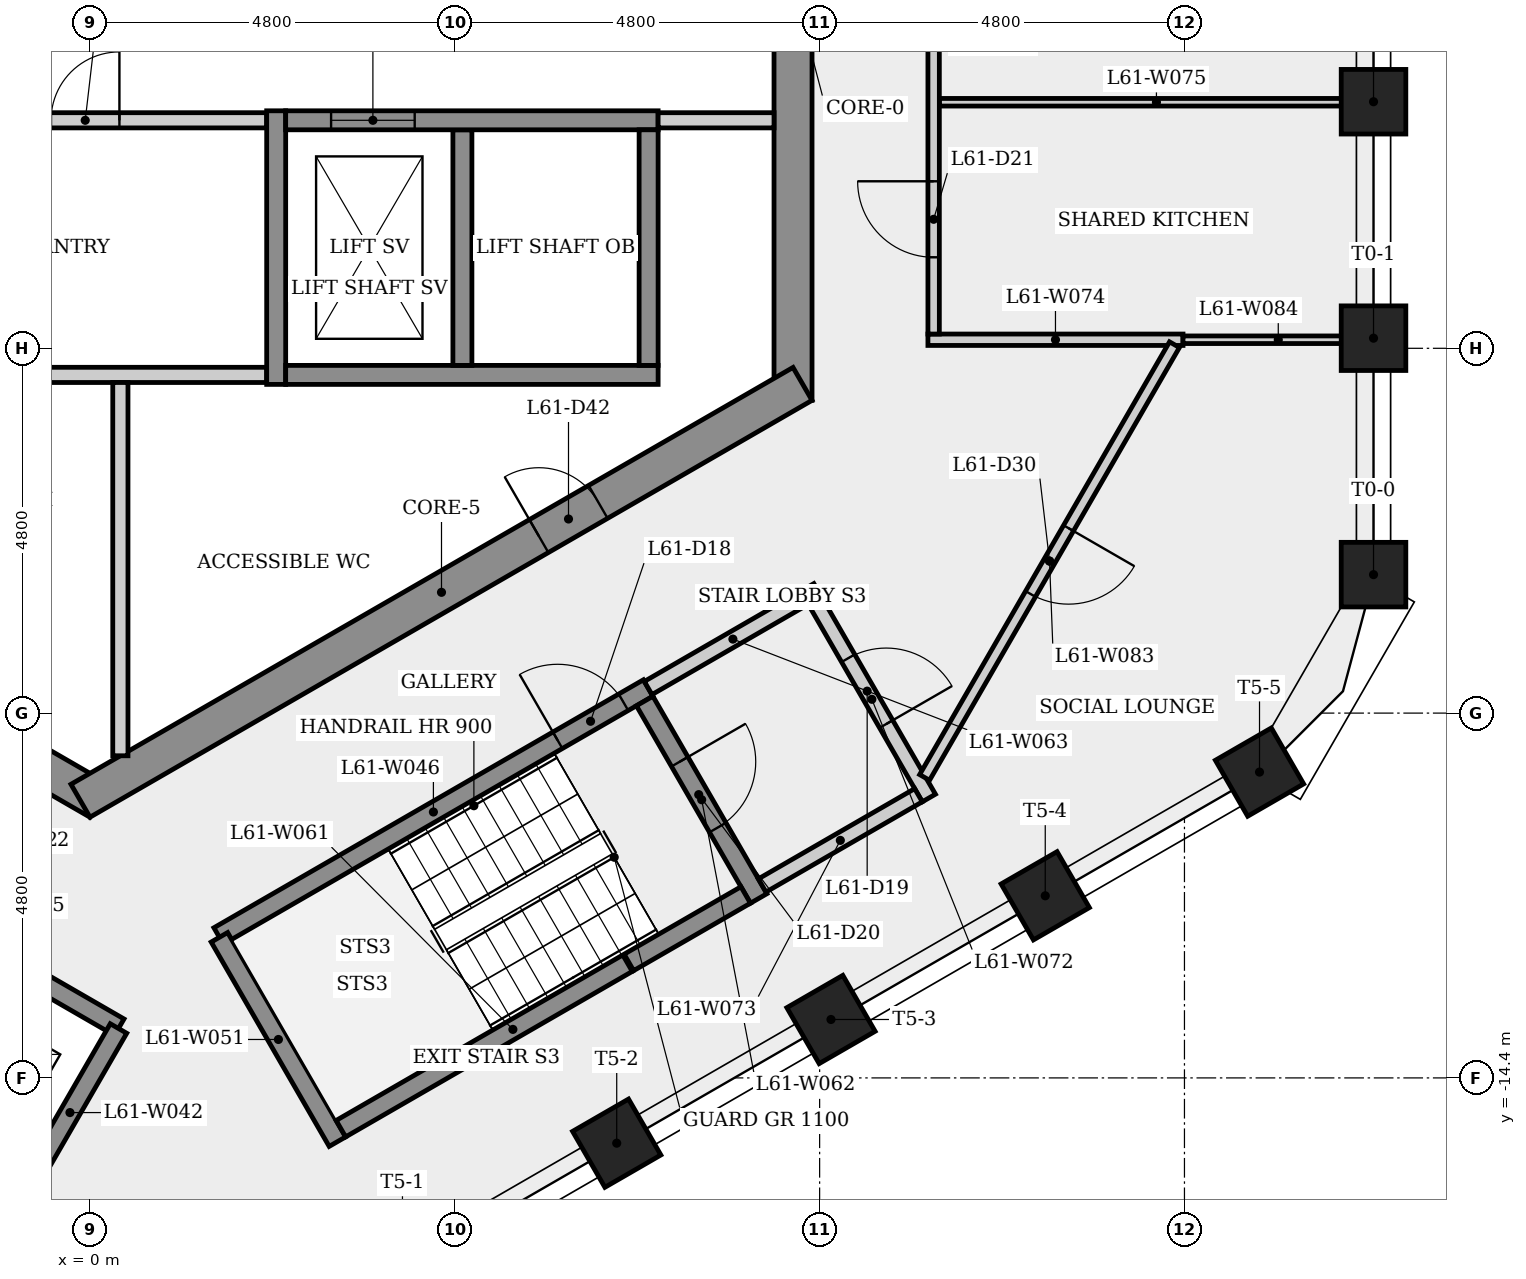
"""IFC4 building model, lengths in metres.
Left out: names, types, materials, properties, quantities, classifications, styles, units other than length and angle.
Written with IfcOpenShell. Run it as: python <this file> out.ifc"""

import sys

from ifc_helpers import new_model, si_unit, direction, frame, frame_2d, origin, origin_2d, place, context, subcontext, project, spatial, rectangle, extrude, element, fill, save


model = new_model("IFC4")
c1 = context("Model", 3, precision=1e-05, world=origin(), true_north=direction((0.0, 1.0)))
c2 = subcontext(c1, "Body", "Model", "MODEL_VIEW")
j1 = project(units=[si_unit("LENGTHUNIT", "METRE"), si_unit("PLANEANGLEUNIT", "RADIAN")], contexts=[c1])
p1 = place(None, origin())
s1 = spatial("IfcSite", under=j1, at=p1, CompositionType="ELEMENT")
p2 = place(p1, origin())
s2 = spatial("IfcBuilding", under=s1, at=p2, CompositionType="ELEMENT")
p3 = place(p2, frame((0.0, 0.0, 229.1)))
s3 = spatial("IfcBuildingStorey", under=s2, at=p3, CompositionType="ELEMENT", Elevation=229.1)
p4 = place(p3, frame((9.25, -5.485, 0.0), z_axis=(0.0, 0.0, 1.0), x_axis=(0.0, 1.0, 0.0)))
e1 = element("IfcWall", 1, at=p4, inside=s3, PredefinedType="SHEAR", context=c2, shape_type="SweptSolid", body=[
    extrude(rectangle(XDim=10.97, YDim=0.5, at=frame_2d((5.485, 0.0))), origin(), (0.0, 0.0, 1.0), 3.4),
])
p5 = place(p4, frame((4.685, 0.0, 0.0)))
e2 = element("IfcOpeningElement", 2, at=p5, cuts=e1, PredefinedType="OPENING", context=c2, shape_type="SweptSolid", body=[
    extrude(rectangle(XDim=1.6, YDim=2.1, at=frame_2d((0.8, 1.05))), frame((0.0, 0.26, 0.0), z_axis=(0.0, -1.0, 0.0), x_axis=(1.0, 0.0, 0.0)), (0.0, 0.0, 1.0), 0.52),
])
p6 = place(p3, frame((-9.375, -5.268, 0.0), z_axis=(0.0, 0.0, 1.0), x_axis=(0.866023993627, -0.500002442456, 0.0)))
e3 = element("IfcWall", 3, at=p6, inside=s3, PredefinedType="SHEAR", context=c2, shape_type="SweptSolid", body=[
    extrude(rectangle(XDim=10.97, YDim=0.5, at=frame_2d((5.485, 0.0))), origin(), (0.0, 0.0, 1.0), 3.4),
])
p7 = place(p6, frame((3.073, 0.0, 0.0)))
e4 = element("IfcOpeningElement", 4, at=p7, cuts=e3, PredefinedType="OPENING", context=c2, shape_type="SweptSolid", body=[
    extrude(rectangle(XDim=0.9, YDim=2.1, at=frame_2d((0.45, 1.05))), frame((0.0, 0.26, 0.0), z_axis=(0.0, -1.0, 0.0), x_axis=(1.0, 0.0, 0.0)), (0.0, 0.0, 1.0), 0.52),
])
p8 = place(p6, frame((8.267, 0.0, 0.0)))
e5 = element("IfcOpeningElement", 5, at=p8, cuts=e3, PredefinedType="OPENING", context=c2, shape_type="SweptSolid", body=[
    extrude(rectangle(XDim=0.9, YDim=2.1, at=frame_2d((0.45, 1.05))), frame((0.0, 0.26, 0.0), z_axis=(0.0, -1.0, 0.0), x_axis=(1.0, 0.0, 0.0)), (0.0, 0.0, 1.0), 0.52),
])
p9 = place(p3, frame((-0.125, -10.753, 0.0), z_axis=(0.0, 0.0, 1.0), x_axis=(0.866023993627, 0.500002442456, 0.0)))
e6 = element("IfcWall", 6, at=p9, inside=s3, PredefinedType="SHEAR", context=c2, shape_type="SweptSolid", body=[
    extrude(rectangle(XDim=10.97, YDim=0.5, at=frame_2d((5.485, 0.0))), origin(), (0.0, 0.0, 1.0), 3.4),
])
p10 = place(p9, frame((6.964, 0.0, 0.0)))
e7 = element("IfcOpeningElement", 7, at=p10, cuts=e6, PredefinedType="OPENING", context=c2, shape_type="SweptSolid", body=[
    extrude(rectangle(XDim=0.9, YDim=2.1, at=frame_2d((0.45, 1.05))), frame((0.0, 0.26, 0.0), z_axis=(0.0, -1.0, 0.0), x_axis=(1.0, 0.0, 0.0)), (0.0, 0.0, 1.0), 0.52),
])
for number, where, z_axis, x_axis in (
    (8, (16.887, -7.778, 0.0), (0.0, 0.0, 1.0), (1.0, 0.0, 0.0)),
    (9, (16.887, -4.667, 0.0), (0.0, 0.0, 1.0), (1.0, 0.0, 0.0)),
    (10, (16.887, -1.556, 0.0), (0.0, 0.0, 1.0), (1.0, 0.0, 0.0)),
    (11, (6.93, -15.259, 0.0), (0.0, 0.0, 1.0), (0.5, -0.866, 0.0)),
    (12, (9.75, -13.631, 0.0), (0.0, 0.0, 1.0), (0.5, -0.866, 0.0)),
    (13, (12.568, -12.004, 0.0), (0.0, 0.0, 1.0), (0.5, -0.866, 0.0)),
    (14, (15.387, -10.376, 0.0), (0.0, 0.0, 1.0), (0.5, -0.866, 0.0)),
):
    element("IfcColumn", number, at=place(p3, frame(where, z_axis=z_axis, x_axis=x_axis)), inside=s3, PredefinedType="COLUMN", context=c2, shape_type="SweptSolid", body=[
        extrude(rectangle(XDim=0.85, YDim=0.85, at=origin_2d()), origin(), (0.0, 0.0, 1.0), 3.4),
    ])
p11 = place(p3, frame((-9.0, -5.15, 0.0), z_axis=(0.0, 0.0, 1.0), x_axis=(1.0, 0.0, 0.0)))
e15 = element("IfcWall", 15, at=p11, inside=s3, PredefinedType="PARTITIONING", context=c2, shape_type="SweptSolid", body=[
    extrude(rectangle(XDim=11.325, YDim=0.2, at=frame_2d((5.663, 0.0))), origin(), (0.0, 0.0, 1.0), 3.05),
])
p12 = place(p3, frame((-9.0, -1.8, 0.0), z_axis=(0.0, 0.0, 1.0), x_axis=(1.0, 0.0, 0.0)))
e16 = element("IfcWall", 16, at=p12, inside=s3, PredefinedType="PARTITIONING", context=c2, shape_type="SweptSolid", body=[
    extrude(rectangle(XDim=11.325, YDim=0.2, at=frame_2d((5.663, 0.0))), origin(), (0.0, 0.0, 1.0), 3.05),
])
p13 = place(p12, frame((2.535, 0.0, 0.0)))
e17 = element("IfcOpeningElement", 17, at=p13, cuts=e16, PredefinedType="OPENING", context=c2, shape_type="SweptSolid", body=[
    extrude(rectangle(XDim=0.9, YDim=2.1, at=frame_2d((0.45, 1.05))), frame((0.0, 0.11, 0.0), z_axis=(0.0, -1.0, 0.0), x_axis=(1.0, 0.0, 0.0)), (0.0, 0.0, 1.0), 0.22),
])
p14 = place(p12, frame((8.488, 0.0, 0.0)))
e18 = element("IfcOpeningElement", 18, at=p14, cuts=e16, PredefinedType="OPENING", context=c2, shape_type="SweptSolid", body=[
    extrude(rectangle(XDim=0.9, YDim=2.1, at=frame_2d((0.45, 1.05))), frame((0.0, 0.11, 0.0), z_axis=(0.0, -1.0, 0.0), x_axis=(1.0, 0.0, 0.0)), (0.0, 0.0, 1.0), 0.22),
])
p15 = place(p3, frame((-2.364, -12.145, 0.0), z_axis=(0.0, 0.0, 1.0), x_axis=(0.866048579423, -0.499959856469, 0.0)))
e19 = element("IfcWall", 19, at=p15, inside=s3, PredefinedType="SHEAR", context=c2, shape_type="SweptSolid", body=[
    extrude(rectangle(XDim=3.175, YDim=0.25, at=frame_2d((1.587, 0.0))), origin(), (0.0, 0.0, 1.0), 3.4),
])
p16 = place(p3, frame((0.375, -13.75, 0.0), z_axis=(0.0, 0.0, 1.0), x_axis=(-0.50003400563, -0.866005769735, 0.0)))
e20 = element("IfcWall", 20, at=p16, inside=s3, PredefinedType="SHEAR", context=c2, shape_type="SweptSolid", body=[
    extrude(rectangle(XDim=2.555, YDim=0.25, at=frame_2d((1.277, 0.0))), origin(), (0.0, 0.0, 1.0), 3.4),
])
p17 = place(p3, frame((0.4, -5.25, 0.0), z_axis=(0.0, 0.0, 1.0), x_axis=(0.0, -1.0, 0.0)))
e21 = element("IfcWall", 21, at=p17, inside=s3, PredefinedType="PARTITIONING", context=c2, shape_type="SweptSolid", body=[
    extrude(rectangle(XDim=4.911, YDim=0.2, at=frame_2d((2.456, 0.0))), origin(), (0.0, 0.0, 1.0), 3.05),
])
p18 = place(p3, frame((1.693, -12.532, 0.0), z_axis=(0.0, 0.0, 1.0), x_axis=(0.866031063448, 0.499990197047, 0.0)))
e22 = element("IfcWall", 22, at=p18, inside=s3, PredefinedType="SHEAR", context=c2, shape_type="SweptSolid", body=[
    extrude(rectangle(XDim=6.525, YDim=0.25, at=frame_2d((3.263, 0.0))), origin(), (0.0, 0.0, 1.0), 3.05),
])
p19 = place(p18, frame((5.15, 0.0, 0.0)))
e23 = element("IfcOpeningElement", 23, at=p19, cuts=e22, PredefinedType="OPENING", context=c2, shape_type="SweptSolid", body=[
    extrude(rectangle(XDim=1.0, YDim=2.1, at=frame_2d((0.5, 1.05))), frame((0.0, 0.135, 0.0), z_axis=(0.0, -1.0, 0.0), x_axis=(1.0, 0.0, 0.0)), (0.0, 0.0, 1.0), 0.27),
])
p20 = place(p3, frame((2.45, -5.275, 0.0), z_axis=(0.0, 0.0, 1.0), x_axis=(0.0, 1.0, 0.0)))
e24 = element("IfcWall", 24, at=p20, inside=s3, PredefinedType="SHEAR", context=c2, shape_type="SweptSolid", body=[
    extrude(rectangle(XDim=3.6, YDim=0.25, at=frame_2d((1.8, 0.0))), origin(), (0.0, 0.0, 1.0), 3.05),
])
p21 = place(p3, frame((3.256, -15.239, 0.0), z_axis=(0.0, 0.0, 1.0), x_axis=(-0.500003782172, 0.866023220135, 0.0)))
e25 = element("IfcWall", 25, at=p21, inside=s3, PredefinedType="SHEAR", context=c2, shape_type="SweptSolid", body=[
    extrude(rectangle(XDim=3.105, YDim=0.25, at=frame_2d((1.552, 0.0))), origin(), (0.0, 0.0, 1.0), 3.05),
])
p22 = place(p3, frame((2.575, -5.15, 0.0), z_axis=(0.0, 0.0, 1.0), x_axis=(1.0, 0.0, 0.0)))
e26 = element("IfcWall", 26, at=p22, inside=s3, PredefinedType="SHEAR", context=c2, shape_type="SweptSolid", body=[
    extrude(rectangle(XDim=4.9, YDim=0.25, at=frame_2d((2.45, 0.0))), origin(), (0.0, 0.0, 1.0), 3.05),
])
p23 = place(p3, frame((4.9, -1.925, 0.0), z_axis=(0.0, 0.0, 1.0), x_axis=(0.0, -1.0, 0.0)))
e27 = element("IfcWall", 27, at=p23, inside=s3, PredefinedType="SHEAR", context=c2, shape_type="SweptSolid", body=[
    extrude(rectangle(XDim=3.1, YDim=0.25, at=frame_2d((1.55, 0.0))), origin(), (0.0, 0.0, 1.0), 3.4),
])
p24 = place(p3, frame((2.575, -1.8, 0.0), z_axis=(0.0, 0.0, 1.0), x_axis=(1.0, 0.0, 0.0)))
e28 = element("IfcWall", 28, at=p24, inside=s3, PredefinedType="SHEAR", context=c2, shape_type="SweptSolid", body=[
    extrude(rectangle(XDim=4.9, YDim=0.25, at=frame_2d((2.45, 0.0))), origin(), (0.0, 0.0, 1.0), 3.05),
])
p25 = place(p24, frame((0.597, 0.0, 0.0)))
e29 = element("IfcOpeningElement", 29, at=p25, cuts=e28, PredefinedType="OPENING", context=c2, shape_type="SweptSolid", body=[
    extrude(rectangle(XDim=1.1, YDim=2.1, at=frame_2d((0.55, 1.05))), frame((0.0, 0.135, 0.0), z_axis=(0.0, -1.0, 0.0), x_axis=(1.0, 0.0, 0.0)), (0.0, 0.0, 1.0), 0.27),
])
p26 = place(p3, frame((7.073, -12.891, 0.0), z_axis=(0.0, 0.0, 1.0), x_axis=(-0.866023145199, -0.500003911965, 0.0)))
e30 = element("IfcWall", 30, at=p26, inside=s3, PredefinedType="SHEAR", context=c2, shape_type="SweptSolid", body=[
    extrude(rectangle(XDim=4.355, YDim=0.25, at=frame_2d((2.177, 0.0))), origin(), (0.0, 0.0, 1.0), 3.05),
])
p27 = place(p3, frame((7.298, -9.441, 0.0), z_axis=(0.0, 0.0, 1.0), x_axis=(0.50002537861, -0.866010750942, 0.0)))
e31 = element("IfcWall", 31, at=p27, inside=s3, PredefinedType="SHEAR", context=c2, shape_type="SweptSolid", body=[
    extrude(rectangle(XDim=3.0, YDim=0.25, at=frame_2d((1.5, 0.0))), origin(), (0.0, 0.0, 1.0), 3.05),
])
p28 = place(p27, frame((0.923, 0.0, 0.0)))
e32 = element("IfcOpeningElement", 32, at=p28, cuts=e31, PredefinedType="OPENING", context=c2, shape_type="SweptSolid", body=[
    extrude(rectangle(XDim=1.0, YDim=2.1, at=frame_2d((0.5, 1.05))), frame((0.0, 0.135, 0.0), z_axis=(0.0, -1.0, 0.0), x_axis=(1.0, 0.0, 0.0)), (0.0, 0.0, 1.0), 0.27),
])
p29 = place(p3, frame((7.344, -9.27, 0.0), z_axis=(0.0, 0.0, 1.0), x_axis=(0.866005588531, 0.500034319456, 0.0)))
e33 = element("IfcWall", 33, at=p29, inside=s3, PredefinedType="PARTITIONING", context=c2, shape_type="SweptSolid", body=[
    extrude(rectangle(XDim=2.575, YDim=0.2, at=frame_2d((1.288, 0.0))), origin(), (0.0, 0.0, 1.0), 3.05),
])
p30 = place(p3, frame((7.35, -1.925, 0.0), z_axis=(0.0, 0.0, 1.0), x_axis=(0.0, -1.0, 0.0)))
e34 = element("IfcWall", 34, at=p30, inside=s3, PredefinedType="SHEAR", context=c2, shape_type="SweptSolid", body=[
    extrude(rectangle(XDim=3.1, YDim=0.25, at=frame_2d((1.55, 0.0))), origin(), (0.0, 0.0, 1.0), 3.4),
])
p31 = place(p3, frame((8.627, -11.993, 0.0), z_axis=(0.0, 0.0, 1.0), x_axis=(-0.866059624469, -0.499940723351, 0.0)))
e35 = element("IfcWall", 35, at=p31, inside=s3, PredefinedType="SHEAR", context=c2, shape_type="SweptSolid", body=[
    extrude(rectangle(XDim=1.775, YDim=0.25, at=frame_2d((0.888, 0.0))), origin(), (0.0, 0.0, 1.0), 3.05),
])
p32 = place(p3, frame((9.0, -1.8, 0.0), z_axis=(0.0, 0.0, 1.0), x_axis=(-1.0, 0.0, 0.0)))
e36 = element("IfcWall", 36, at=p32, inside=s3, PredefinedType="PARTITIONING", context=c2, shape_type="SweptSolid", body=[
    extrude(rectangle(XDim=1.525, YDim=0.2, at=frame_2d((0.763, 0.0))), origin(), (0.0, 0.0, 1.0), 3.05),
])
p33 = place(p3, frame((9.537, -8.119, 0.0), z_axis=(0.0, 0.0, 1.0), x_axis=(0.499990139034, -0.866031096941, 0.0)))
e37 = element("IfcWall", 37, at=p33, inside=s3, PredefinedType="PARTITIONING", context=c2, shape_type="SweptSolid", body=[
    extrude(rectangle(XDim=3.0, YDim=0.2, at=frame_2d((1.5, 0.0))), origin(), (0.0, 0.0, 1.0), 3.05),
])
p34 = place(p33, frame((0.876, 0.0, 0.0)))
e38 = element("IfcOpeningElement", 38, at=p34, cuts=e37, PredefinedType="OPENING", context=c2, shape_type="SweptSolid", body=[
    extrude(rectangle(XDim=1.0, YDim=2.1, at=frame_2d((0.5, 1.05))), frame((0.0, 0.11, 0.0), z_axis=(0.0, -1.0, 0.0), x_axis=(1.0, 0.0, 0.0)), (0.0, 0.0, 1.0), 0.22),
])
p35 = place(p3, frame((10.901, -10.681, 0.0), z_axis=(0.0, 0.0, 1.0), x_axis=(-0.866007538022, -0.500030943131, 0.0)))
e39 = element("IfcWall", 39, at=p35, inside=s3, PredefinedType="PARTITIONING", context=c2, shape_type="SweptSolid", body=[
    extrude(rectangle(XDim=2.375, YDim=0.2, at=frame_2d((1.188, 0.0))), origin(), (0.0, 0.0, 1.0), 3.05),
])
p36 = place(p3, frame((11.025, -4.688, 0.0), z_axis=(0.0, 0.0, 1.0), x_axis=(1.0, 0.0, 0.0)))
e40 = element("IfcWall", 40, at=p36, inside=s3, PredefinedType="PARTITIONING", context=c2, shape_type="SweptSolid", body=[
    extrude(rectangle(XDim=3.356, YDim=0.15, at=frame_2d((1.678, 0.0))), origin(), (0.0, 0.0, 1.0), 3.05),
])
p37 = place(p3, frame((11.175, -1.562, 0.0), z_axis=(0.0, 0.0, 1.0), x_axis=(1.0, 0.0, 0.0)))
e41 = element("IfcWall", 41, at=p37, inside=s3, PredefinedType="PARTITIONING", context=c2, shape_type="SweptSolid", body=[
    extrude(rectangle(XDim=5.712, YDim=0.1, at=frame_2d((2.856, 0.0))), origin(), (0.0, 0.0, 1.0), 3.05),
])
p38 = place(p3, frame((11.1, -4.612, 0.0), z_axis=(0.0, 0.0, 1.0), x_axis=(0.0, 1.0, 0.0)))
e42 = element("IfcWall", 42, at=p38, inside=s3, PredefinedType="PARTITIONING", context=c2, shape_type="SweptSolid", body=[
    extrude(rectangle(XDim=9.375, YDim=0.15, at=frame_2d((4.688, 0.0))), origin(), (0.0, 0.0, 1.0), 3.05),
])
p39 = place(p38, frame((1.01, 0.0, 0.0)))
e43 = element("IfcOpeningElement", 43, at=p39, cuts=e42, PredefinedType="OPENING", context=c2, shape_type="SweptSolid", body=[
    extrude(rectangle(XDim=1.0, YDim=2.1, at=frame_2d((0.5, 1.05))), frame((0.0, 0.085, 0.0), z_axis=(0.0, -1.0, 0.0), x_axis=(1.0, 0.0, 0.0)), (0.0, 0.0, 1.0), 0.17),
])
p40 = place(p38, frame((4.112, 0.0, 0.0)))
e44 = element("IfcOpeningElement", 44, at=p40, cuts=e42, PredefinedType="OPENING", context=c2, shape_type="SweptSolid", body=[
    extrude(rectangle(XDim=1.0, YDim=2.1, at=frame_2d((0.5, 1.05))), frame((0.0, 0.085, 0.0), z_axis=(0.0, -1.0, 0.0), x_axis=(1.0, 0.0, 0.0)), (0.0, 0.0, 1.0), 0.17),
])
p41 = place(p38, frame((7.237, 0.0, 0.0)))
e45 = element("IfcOpeningElement", 45, at=p41, cuts=e42, PredefinedType="OPENING", context=c2, shape_type="SweptSolid", body=[
    extrude(rectangle(XDim=1.0, YDim=2.1, at=frame_2d((0.5, 1.05))), frame((0.0, 0.085, 0.0), z_axis=(0.0, -1.0, 0.0), x_axis=(1.0, 0.0, 0.0)), (0.0, 0.0, 1.0), 0.17),
])
p42 = place(p3, frame((14.269, -4.752, 0.0), z_axis=(0.0, 0.0, 1.0), x_axis=(-0.50001280117, -0.866018012899, 0.0)))
e46 = element("IfcWall", 46, at=p42, inside=s3, PredefinedType="PARTITIONING", context=c2, shape_type="SweptSolid", body=[
    extrude(rectangle(XDim=6.575, YDim=0.15, at=frame_2d((3.288, 0.0))), origin(), (0.0, 0.0, 1.0), 3.05),
])
p43 = place(p42, frame((2.788, 0.0, 0.0)))
e47 = element("IfcOpeningElement", 47, at=p43, cuts=e46, PredefinedType="OPENING", context=c2, shape_type="SweptSolid", body=[
    extrude(rectangle(XDim=1.0, YDim=2.1, at=frame_2d((0.5, 1.05))), frame((0.0, 0.085, 0.0), z_axis=(0.0, -1.0, 0.0), x_axis=(1.0, 0.0, 0.0)), (0.0, 0.0, 1.0), 0.17),
])
p44 = place(p3, frame((16.887, -4.688, 0.0), z_axis=(0.0, 0.0, 1.0), x_axis=(-1.0, 0.0, 0.0)))
e48 = element("IfcWall", 48, at=p44, inside=s3, PredefinedType="PARTITIONING", context=c2, shape_type="SweptSolid", body=[
    extrude(rectangle(XDim=2.507, YDim=0.1, at=frame_2d((1.253, 0.0))), origin(), (0.0, 0.0, 1.0), 3.05),
])
p45 = place(p25, origin())
e49 = element("IfcDoor", 49, at=p45, inside=s3, OperationType="SLIDING_TO_LEFT", PredefinedType="DOOR", context=c2, shape_type="SweptSolid", body=[
    extrude(rectangle(XDim=1.1, YDim=2.1, at=frame_2d((0.55, 1.05))), frame((0.0, 0.025, 0.0), z_axis=(0.0, -1.0, 0.0), x_axis=(1.0, 0.0, 0.0)), (0.0, 0.0, 1.0), 0.05),
])
fill(e29, e49)
p46 = place(p14, origin())
e50 = element("IfcDoor", 50, at=p46, inside=s3, OperationType="SINGLE_SWING_RIGHT", PredefinedType="DOOR", context=c2, shape_type="SweptSolid", body=[
    extrude(rectangle(XDim=0.9, YDim=2.1, at=frame_2d((0.45, 1.05))), frame((0.0, 0.025, 0.0), z_axis=(0.0, -1.0, 0.0), x_axis=(1.0, 0.0, 0.0)), (0.0, 0.0, 1.0), 0.05),
])
fill(e18, e50)
p47 = place(p19, origin())
e51 = element("IfcDoor", 51, at=p47, inside=s3, OperationType="SINGLE_SWING_LEFT", PredefinedType="DOOR", context=c2, shape_type="SweptSolid", body=[
    extrude(rectangle(XDim=1.0, YDim=2.1, at=frame_2d((0.5, 1.05))), frame((0.0, 0.025, 0.0), z_axis=(0.0, -1.0, 0.0), x_axis=(1.0, 0.0, 0.0)), (0.0, 0.0, 1.0), 0.05),
])
fill(e23, e51)
p48 = place(p34, origin())
e52 = element("IfcDoor", 52, at=p48, inside=s3, OperationType="SINGLE_SWING_RIGHT", PredefinedType="DOOR", context=c2, shape_type="SweptSolid", body=[
    extrude(rectangle(XDim=1.0, YDim=2.1, at=frame_2d((0.5, 1.05))), frame((0.0, 0.025, 0.0), z_axis=(0.0, -1.0, 0.0), x_axis=(1.0, 0.0, 0.0)), (0.0, 0.0, 1.0), 0.05),
])
fill(e38, e52)
p49 = place(p28, origin())
e53 = element("IfcDoor", 53, at=p49, inside=s3, OperationType="SINGLE_SWING_LEFT", PredefinedType="DOOR", context=c2, shape_type="SweptSolid", body=[
    extrude(rectangle(XDim=1.0, YDim=2.1, at=frame_2d((0.5, 1.05))), frame((0.0, 0.025, 0.0), z_axis=(0.0, -1.0, 0.0), x_axis=(1.0, 0.0, 0.0)), (0.0, 0.0, 1.0), 0.05),
])
fill(e32, e53)
p50 = place(p39, origin())
e54 = element("IfcDoor", 54, at=p50, inside=s3, OperationType="SINGLE_SWING_RIGHT", PredefinedType="DOOR", context=c2, shape_type="SweptSolid", body=[
    extrude(rectangle(XDim=1.0, YDim=2.1, at=frame_2d((0.5, 1.05))), frame((0.0, 0.025, 0.0), z_axis=(0.0, -1.0, 0.0), x_axis=(1.0, 0.0, 0.0)), (0.0, 0.0, 1.0), 0.05),
])
fill(e43, e54)
p51 = place(p43, origin())
e55 = element("IfcDoor", 55, at=p51, inside=s3, OperationType="SINGLE_SWING_LEFT", PredefinedType="DOOR", context=c2, shape_type="SweptSolid", body=[
    extrude(rectangle(XDim=1.0, YDim=2.1, at=frame_2d((0.5, 1.05))), frame((0.0, 0.025, 0.0), z_axis=(0.0, -1.0, 0.0), x_axis=(1.0, 0.0, 0.0)), (0.0, 0.0, 1.0), 0.05),
])
fill(e47, e55)
p52 = place(p10, origin())
e56 = element("IfcDoor", 56, at=p52, inside=s3, OperationType="SINGLE_SWING_LEFT", PredefinedType="DOOR", context=c2, shape_type="SweptSolid", body=[
    extrude(rectangle(XDim=0.9, YDim=2.1, at=frame_2d((0.45, 1.05))), frame((0.0, 0.025, 0.0), z_axis=(0.0, -1.0, 0.0), x_axis=(1.0, 0.0, 0.0)), (0.0, 0.0, 1.0), 0.05),
])
fill(e7, e56)
save(model, sys.argv[1])
